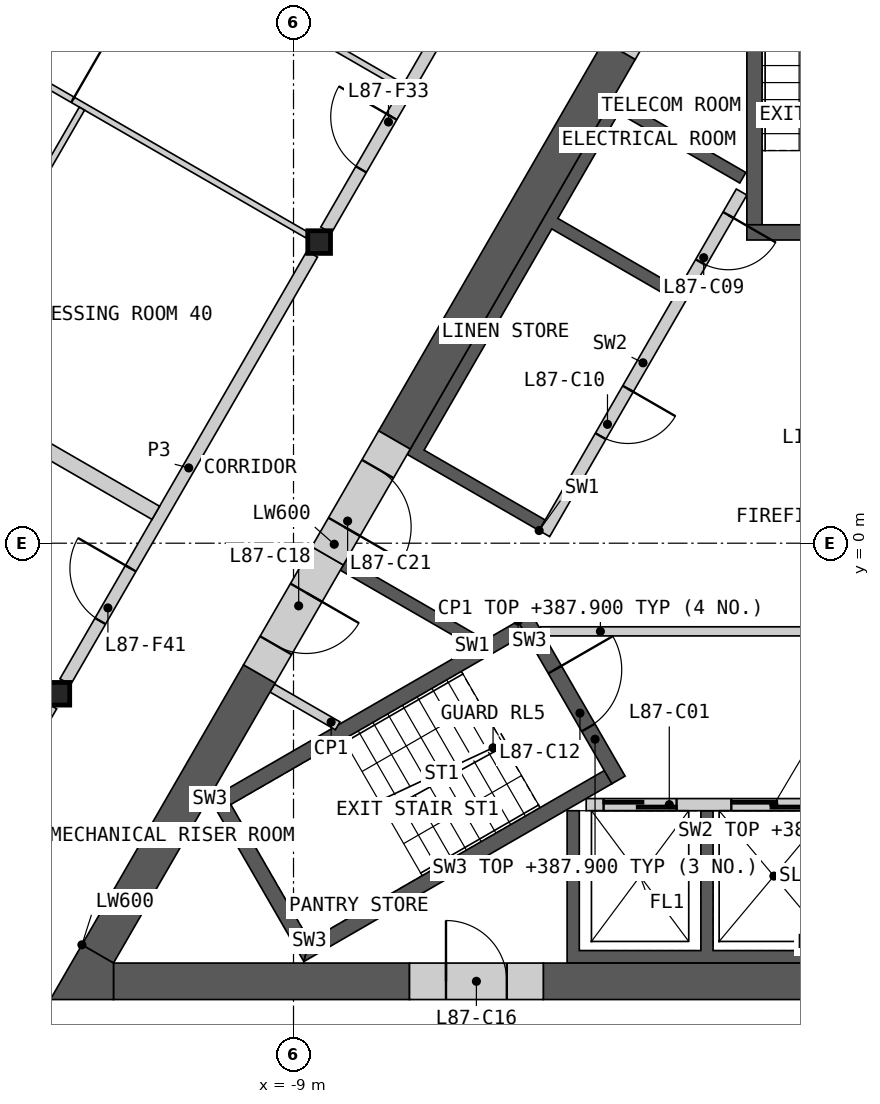
"""IFC4 building model, lengths in metres.
Left out: names, types, materials, properties, quantities, classifications, styles, units other than length and angle.
Written with IfcOpenShell. Run it as: python <this file> out.ifc"""

import sys

from ifc_helpers import new_model, si_unit, direction, frame, frame_2d, origin, origin_2d, place, context, subcontext, project, spatial, polyline, rectangle, i_section, outline, extrude, element, fill, save


model = new_model("IFC4")
c1 = context("Model", 3, precision=1e-05, world=origin(), true_north=direction((0.0, 1.0)))
c2 = subcontext(c1, "Body", "Model", "MODEL_VIEW")
j1 = project(units=[si_unit("LENGTHUNIT", "METRE"), si_unit("PLANEANGLEUNIT", "RADIAN")], contexts=[c1])
p1 = place(None, origin())
s1 = spatial("IfcSite", under=j1, at=p1, CompositionType="ELEMENT")
p2 = place(p1, origin())
s2 = spatial("IfcBuilding", under=s1, at=p2, CompositionType="ELEMENT")
p3 = place(p2, frame((0.0, 0.0, 384.8)))
s3 = spatial("IfcBuildingStorey", under=s2, at=p3, CompositionType="ELEMENT", Elevation=384.8)
for number, where, z_axis, x_axis in (
    (1, (-8.578, 4.953, 0.0), (0.0, 0.0, 1.0), (1.0, 0.0, 0.0)),
    (2, (-12.868, -2.476, 0.0), (0.0, 0.0, 1.0), (1.0, 0.0, 0.0)),
):
    element("IfcColumn", number, at=place(p3, frame(where, z_axis=z_axis, x_axis=x_axis)), inside=s3, PredefinedType="COLUMN", context=c2, shape_type="SweptSolid", body=[
        extrude(i_section(OverallWidth=0.374, OverallDepth=0.372, WebThickness=0.016, FlangeThickness=0.026, at=origin_2d()), origin(), (0.0, 0.0, 1.0), 3.4),
    ])
p4 = place(p3, origin())
e3 = element("IfcWall", 3, at=p4, inside=s3, PredefinedType="SHEAR", context=c2, shape_type="SweptSolid", body=[
    extrude(outline(polyline([(4.5, -4.4), (4.5, -6.906), (-4.5, -6.906), (-4.5, -4.4), (-4.3, -4.4), (-4.3, -6.7), (-2.3, -6.7), (-2.3, -4.4), (-2.1, -4.4), (-2.1, -6.7), (-0.1, -6.7), (-0.1, -4.4), (0.1, -4.4), (0.1, -6.7), (2.1, -6.7), (2.1, -4.4), (2.3, -4.4), (2.3, -6.7), (4.3, -6.7), (4.3, -4.4), (4.5, -4.4)])), origin(), (0.0, 0.0, 1.0), 3.1),
])
p5 = place(p3, frame((-4.187, -4.3, 0.0), z_axis=(0.0, 0.0, 1.0), x_axis=(1.0, 0.0, 0.0)))
e4 = element("IfcWall", 4, at=p5, inside=s3, PredefinedType="SOLIDWALL", context=c2, shape_type="SweptSolid", body=[
    extrude(rectangle(XDim=8.373, YDim=0.2, at=frame_2d((4.187, 0.0))), origin(), (0.0, 0.0, 1.0), 3.1),
])
p6 = place(p5, frame((0.287, 0.0, 0.0)))
e5 = element("IfcOpeningElement", 5, at=p6, cuts=e4, PredefinedType="OPENING", context=c2, shape_type="SweptSolid", body=[
    extrude(rectangle(XDim=1.2, YDim=2.1, at=frame_2d((0.6, 1.05))), frame((0.0, 0.11, 0.0), z_axis=(0.0, -1.0, 0.0), x_axis=(1.0, 0.0, 0.0)), (0.0, 0.0, 1.0), 0.22),
])
p7 = place(p5, frame((2.387, 0.0, 0.0)))
e6 = element("IfcOpeningElement", 6, at=p7, cuts=e4, PredefinedType="OPENING", context=c2, shape_type="SweptSolid", body=[
    extrude(rectangle(XDim=1.4, YDim=2.1, at=frame_2d((0.7, 1.05))), frame((0.0, 0.11, 0.0), z_axis=(0.0, -1.0, 0.0), x_axis=(1.0, 0.0, 0.0)), (0.0, 0.0, 1.0), 0.22),
])
p8 = place(p5, frame((4.737, 0.0, 0.0)))
e7 = element("IfcOpeningElement", 7, at=p8, cuts=e4, PredefinedType="OPENING", context=c2, shape_type="SweptSolid", body=[
    extrude(rectangle(XDim=1.1, YDim=2.1, at=frame_2d((0.55, 1.05))), frame((0.0, 0.11, 0.0), z_axis=(0.0, -1.0, 0.0), x_axis=(1.0, 0.0, 0.0)), (0.0, 0.0, 1.0), 0.22),
])
p9 = place(p5, frame((6.887, 0.0, 0.0)))
e8 = element("IfcOpeningElement", 8, at=p9, cuts=e4, PredefinedType="OPENING", context=c2, shape_type="SweptSolid", body=[
    extrude(rectangle(XDim=1.2, YDim=2.1, at=frame_2d((0.6, 1.05))), frame((0.0, 0.11, 0.0), z_axis=(0.0, -1.0, 0.0), x_axis=(1.0, 0.0, 0.0)), (0.0, 0.0, 1.0), 0.22),
])
p10 = place(p3, origin())
e9 = element("IfcWall", 9, at=p10, inside=s3, PredefinedType="SHEAR", context=c2, shape_type="SweptSolid", body=[
    extrude(outline(polyline([(-6.061, -1.697), (-8.231, -0.444), (-8.131, -0.271), (-5.96, -1.524), (-6.061, -1.697)])), origin(), (0.0, 0.0, 1.0), 3.1),
])
p11 = place(p3, origin())
e10 = element("IfcWall", 10, at=p11, inside=s3, PredefinedType="SHEAR", context=c2, shape_type="SweptSolid", body=[
    extrude(outline(polyline([(-4.96, 0.208), (-7.131, 1.461), (-3.731, 7.35), (-1.561, 6.097), (-1.66, 5.924), (-3.652, 7.074), (-4.652, 5.342), (-2.66, 4.192), (-2.76, 4.019), (-4.752, 5.169), (-6.852, 1.531), (-4.861, 0.381), (-4.96, 0.208)])), origin(), (0.0, 0.0, 1.0), 3.1),
])
p12 = place(p3, frame((-1.631, 5.776, 0.0), z_axis=(0.0, 0.0, 1.0), x_axis=(-0.499992876559, -0.866029516466, 0.0)))
e11 = element("IfcWall", 11, at=p12, inside=s3, PredefinedType="SOLIDWALL", context=c2, shape_type="SweptSolid", body=[
    extrude(rectangle(XDim=6.486, YDim=0.2, at=frame_2d((3.243, 0.0))), origin(), (0.0, 0.0, 1.0), 3.1),
])
p13 = place(p12, frame((0.437, 0.0, 0.0)))
e12 = element("IfcOpeningElement", 12, at=p13, cuts=e11, PredefinedType="OPENING", context=c2, shape_type="SweptSolid", body=[
    extrude(rectangle(XDim=0.9, YDim=2.1, at=frame_2d((0.45, 1.05))), frame((0.0, 0.11, 0.0), z_axis=(0.0, -1.0, 0.0), x_axis=(1.0, 0.0, 0.0)), (0.0, 0.0, 1.0), 0.22),
])
p14 = place(p12, frame((3.737, 0.0, 0.0)))
e13 = element("IfcOpeningElement", 13, at=p14, cuts=e11, PredefinedType="OPENING", context=c2, shape_type="SweptSolid", body=[
    extrude(rectangle(XDim=0.9, YDim=2.1, at=frame_2d((0.45, 1.05))), frame((0.0, 0.11, 0.0), z_axis=(0.0, -1.0, 0.0), x_axis=(1.0, 0.0, 0.0)), (0.0, 0.0, 1.0), 0.22),
])
p15 = place(p3, frame((-4.941, -1.45, 0.0), z_axis=(0.0, 0.0, 1.0), x_axis=(1.0, 0.0, 0.0)))
e14 = element("IfcWall", 14, at=p15, inside=s3, PredefinedType="PARTITIONING", context=c2, shape_type="SweptSolid", body=[
    extrude(rectangle(XDim=9.882, YDim=0.15, at=frame_2d((4.941, 0.0))), origin(), (0.0, 0.0, 1.0), 3.1),
])
p16 = place(p15, frame((4.391, 0.0, 0.0)))
e15 = element("IfcOpeningElement", 15, at=p16, cuts=e14, PredefinedType="OPENING", context=c2, shape_type="SweptSolid", body=[
    extrude(rectangle(XDim=1.1, YDim=2.1, at=frame_2d((0.55, 1.05))), frame((0.0, 0.085, 0.0), z_axis=(0.0, -1.0, 0.0), x_axis=(1.0, 0.0, 0.0)), (0.0, 0.0, 1.0), 0.17),
])
p17 = place(p3, origin())
e16 = element("IfcWall", 16, at=p17, inside=s3, PredefinedType="SHEAR", context=c2, shape_type="SweptSolid", body=[
    extrude(outline(polyline([(-5.307, -1.281), (-10.374, -4.206), (-10.032, -4.298), (-5.182, -1.498), (-5.307, -1.281)])), origin(), (0.0, 0.0, 1.0), 3.1),
])
p18 = place(p3, origin())
e17 = element("IfcWall", 17, at=p18, inside=s3, PredefinedType="SHEAR", context=c2, shape_type="SweptSolid", body=[
    extrude(outline(polyline([(-10.374, -4.206), (-8.83, -6.881), (-8.738, -6.539), (-10.032, -4.298), (-10.374, -4.206)])), origin(), (0.0, 0.0, 1.0), 3.1),
])
p19 = place(p3, origin())
e18 = element("IfcWall", 18, at=p19, inside=s3, PredefinedType="SHEAR", context=c2, shape_type="SweptSolid", body=[
    extrude(outline(polyline([(-8.738, -6.539), (-8.83, -6.881), (-3.763, -3.956), (-3.888, -3.739), (-8.738, -6.539)])), origin(), (0.0, 0.0, 1.0), 3.1),
])
p20 = place(p3, frame((-5.199, -1.219, 0.0), z_axis=(0.0, 0.0, 1.0), x_axis=(0.499982516597, -0.866035497597, 0.0)))
e19 = element("IfcWall", 19, at=p20, inside=s3, PredefinedType="SHEAR", context=c2, shape_type="SweptSolid", body=[
    extrude(rectangle(XDim=3.088, YDim=0.25, at=frame_2d((1.544, 0.0))), origin(), (0.0, 0.0, 1.0), 3.1),
])
p21 = place(p20, frame((0.994, 0.0, 0.0)))
e20 = element("IfcOpeningElement", 20, at=p21, cuts=e19, PredefinedType="OPENING", context=c2, shape_type="SweptSolid", body=[
    extrude(rectangle(XDim=1.1, YDim=2.1, at=frame_2d((0.55, 1.05))), frame((0.0, 0.135, 0.0), z_axis=(0.0, -1.0, 0.0), x_axis=(1.0, 0.0, 0.0)), (0.0, 0.0, 1.0), 0.27),
])
p22 = place(p3, origin())
e21 = element("IfcWall", 21, at=p22, inside=s3, PredefinedType="SHEAR", context=c2, shape_type="SweptSolid", body=[
    extrude(outline(polyline([(-1.294, 10.837), (-1.544, 11.087), (-1.544, 5.237), (-1.294, 5.237), (-1.294, 10.837)])), origin(), (0.0, 0.0, 1.0), 3.1),
])
p23 = place(p3, frame((1.544, 5.112, 0.0), z_axis=(0.0, 0.0, 1.0), x_axis=(-1.0, 0.0, 0.0)))
e22 = element("IfcWall", 22, at=p23, inside=s3, PredefinedType="SHEAR", context=c2, shape_type="SweptSolid", body=[
    extrude(rectangle(XDim=3.088, YDim=0.25, at=frame_2d((1.544, 0.0))), origin(), (0.0, 0.0, 1.0), 3.1),
])
p24 = place(p23, frame((0.994, 0.0, 0.0)))
e23 = element("IfcOpeningElement", 23, at=p24, cuts=e22, PredefinedType="OPENING", context=c2, shape_type="SweptSolid", body=[
    extrude(rectangle(XDim=1.1, YDim=2.1, at=frame_2d((0.55, 1.05))), frame((0.0, 0.135, 0.0), z_axis=(0.0, -1.0, 0.0), x_axis=(1.0, 0.0, 0.0)), (0.0, 0.0, 1.0), 0.27),
])
p25 = place(p3, frame((-9.35, -2.383, 0.0), z_axis=(0.0, 0.0, 1.0), x_axis=(0.866057962423, -0.499943602543, 0.0)))
e24 = element("IfcWall", 24, at=p25, inside=s3, PredefinedType="PARTITIONING", context=c2, shape_type="SweptSolid", body=[
    extrude(rectangle(XDim=1.242, YDim=0.15, at=frame_2d((0.621, 0.0))), origin(), (0.0, 0.0, 1.0), 3.1),
])
p26 = place(p3, frame((-4.892, -7.206, 0.0), z_axis=(0.0, 0.0, 1.0), x_axis=(1.0, 0.0, 0.0)))
e25 = element("IfcWall", 25, at=p26, inside=s3, PredefinedType="SHEAR", context=c2, shape_type="SweptSolid", body=[
    extrude(rectangle(XDim=14.261, YDim=0.6, at=frame_2d((7.13, 0.0))), origin(), (0.0, 0.0, 1.0), 3.1),
])
p27 = place(p3, frame((-11.961, -7.206, 0.0), z_axis=(0.0, 0.0, 1.0), x_axis=(1.0, 0.0, 0.0)))
e26 = element("IfcWall", 26, at=p27, inside=s3, PredefinedType="SHEAR", context=c2, shape_type="SweptSolid", body=[
    extrude(rectangle(XDim=4.868, YDim=0.6, at=frame_2d((2.434, 0.0))), origin(), (0.0, 0.0, 1.0), 3.1),
])
p28 = place(p3, frame((-3.639, 8.107, 0.0), z_axis=(0.0, 0.0, 1.0), x_axis=(-0.49999180351, -0.866030135978, 0.0)))
e27 = element("IfcWall", 27, at=p28, inside=s3, PredefinedType="SHEAR", context=c2, shape_type="SweptSolid", body=[
    extrude(rectangle(XDim=7.401, YDim=0.6, at=frame_2d((3.701, 0.0))), origin(), (0.0, 0.0, 1.0), 3.1),
])
p29 = place(p3, frame((-9.562, -2.15, 0.0), z_axis=(0.0, 0.0, 1.0), x_axis=(-0.500015214976, -0.866016619236, 0.0)))
e28 = element("IfcWall", 28, at=p29, inside=s3, PredefinedType="SHEAR", context=c2, shape_type="SweptSolid", body=[
    extrude(rectangle(XDim=5.318, YDim=0.6, at=frame_2d((2.659, 0.0))), origin(), (0.0, 0.0, 1.0), 3.1),
])
p30 = place(p3, origin())
e29 = element("IfcWall", 29, at=p30, inside=s3, PredefinedType="SHEAR", context=c2, shape_type="SweptSolid", body=[
    extrude(outline(polyline([(-12.48, -6.606), (-11.961, -6.906), (-11.961, -7.506), (-13.0, -7.506), (-12.48, -6.606)])), origin(), (0.0, 0.0, 1.0), 3.1),
])
p31 = place(p3, frame((-7.092, -7.206, 0.0), z_axis=(0.0, 0.0, 1.0), x_axis=(1.0, 0.0, 0.0)))
e30 = element("IfcWall", 30, at=p31, inside=s3, PredefinedType="SHEAR", context=c2, shape_type="SweptSolid", body=[
    extrude(rectangle(XDim=2.2, YDim=0.6, at=frame_2d((1.1, 0.0))), origin(), (0.0, 0.0, 1.0), 3.1),
])
p32 = place(p31, frame((0.6, 0.0, 0.0)))
e31 = element("IfcOpeningElement", 31, at=p32, cuts=e30, PredefinedType="OPENING", context=c2, shape_type="SweptSolid", body=[
    extrude(rectangle(XDim=1.0, YDim=2.1, at=frame_2d((0.5, 1.05))), frame((0.0, 0.31, 0.0), z_axis=(0.0, -1.0, 0.0), x_axis=(1.0, 0.0, 0.0)), (0.0, 0.0, 1.0), 0.62),
])
p33 = place(p3, frame((-8.44, -0.208, 0.0), z_axis=(0.0, 0.0, 1.0), x_axis=(-0.500001951578, -0.866024277037, 0.0)))
e32 = element("IfcWall", 32, at=p33, inside=s3, PredefinedType="SHEAR", context=c2, shape_type="SweptSolid", body=[
    extrude(rectangle(XDim=2.243, YDim=0.6, at=frame_2d((1.122, 0.0))), origin(), (0.0, 0.0, 1.0), 3.1),
])
p34 = place(p33, frame((0.7, 0.0, 0.0)))
e33 = element("IfcOpeningElement", 33, at=p34, cuts=e32, PredefinedType="OPENING", context=c2, shape_type="SweptSolid", body=[
    extrude(rectangle(XDim=1.0, YDim=2.1, at=frame_2d((0.5, 1.05))), frame((0.0, 0.31, 0.0), z_axis=(0.0, -1.0, 0.0), x_axis=(1.0, 0.0, 0.0)), (0.0, 0.0, 1.0), 0.62),
])
p35 = place(p3, frame((-2.539, 10.013, 0.0), z_axis=(0.0, 0.0, 1.0), x_axis=(-0.50002983664, -0.866008176907, 0.0)))
e34 = element("IfcWall", 34, at=p35, inside=s3, PredefinedType="SHEAR", context=c2, shape_type="SweptSolid", body=[
    extrude(rectangle(XDim=2.2, YDim=0.6, at=frame_2d((1.1, 0.0))), origin(), (0.0, 0.0, 1.0), 3.1),
])
p36 = place(p35, frame((0.6, 0.0, 0.0)))
e35 = element("IfcOpeningElement", 35, at=p36, cuts=e34, PredefinedType="OPENING", context=c2, shape_type="SweptSolid", body=[
    extrude(rectangle(XDim=1.0, YDim=2.1, at=frame_2d((0.5, 1.05))), frame((0.0, 0.31, 0.0), z_axis=(0.0, -1.0, 0.0), x_axis=(1.0, 0.0, 0.0)), (0.0, 0.0, 1.0), 0.62),
])
p37 = place(p3, frame((-7.34, 1.698, 0.0), z_axis=(0.0, 0.0, 1.0), x_axis=(-0.50002983664, -0.866008176907, 0.0)))
e36 = element("IfcWall", 36, at=p37, inside=s3, PredefinedType="SHEAR", context=c2, shape_type="SweptSolid", body=[
    extrude(rectangle(XDim=2.2, YDim=0.6, at=frame_2d((1.1, 0.0))), origin(), (0.0, 0.0, 1.0), 3.1),
])
p38 = place(p37, frame((0.55, 0.0, 0.0)))
e37 = element("IfcOpeningElement", 37, at=p38, cuts=e36, PredefinedType="OPENING", context=c2, shape_type="SweptSolid", body=[
    extrude(rectangle(XDim=1.1, YDim=2.1, at=frame_2d((0.55, 1.05))), frame((0.0, 0.31, 0.0), z_axis=(0.0, -1.0, 0.0), x_axis=(1.0, 0.0, 0.0)), (0.0, 0.0, 1.0), 0.62),
])
p39 = place(p3, frame((-8.465, 5.15, 0.0), z_axis=(0.0, 0.0, 1.0), x_axis=(0.499992155518, 0.866029932751, 0.0)))
e38 = element("IfcWall", 38, at=p39, inside=s3, PredefinedType="PARTITIONING", context=c2, shape_type="SweptSolid", body=[
    extrude(rectangle(XDim=8.123, YDim=0.2, at=frame_2d((4.062, 0.0))), origin(), (0.0, 0.0, 1.0), 3.1),
])
p40 = place(p39, frame((1.153, 0.0, 0.0)))
e39 = element("IfcOpeningElement", 39, at=p40, cuts=e38, PredefinedType="OPENING", context=c2, shape_type="SweptSolid", body=[
    extrude(rectangle(XDim=1.0, YDim=2.1, at=frame_2d((0.5, 1.05))), frame((0.0, 0.11, 0.0), z_axis=(0.0, -1.0, 0.0), x_axis=(1.0, 0.0, 0.0)), (0.0, 0.0, 1.0), 0.22),
])
p41 = place(p3, frame((-12.754, -2.279, 0.0), z_axis=(0.0, 0.0, 1.0), x_axis=(0.500001682468, 0.866024432409, 0.0)))
e40 = element("IfcWall", 40, at=p41, inside=s3, PredefinedType="PARTITIONING", context=c2, shape_type="SweptSolid", body=[
    extrude(rectangle(XDim=8.124, YDim=0.2, at=frame_2d((4.062, 0.0))), origin(), (0.0, 0.0, 1.0), 3.1),
])
p42 = place(p41, frame((1.153, 0.0, 0.0)))
e41 = element("IfcOpeningElement", 41, at=p42, cuts=e40, PredefinedType="OPENING", context=c2, shape_type="SweptSolid", body=[
    extrude(rectangle(XDim=1.0, YDim=2.1, at=frame_2d((0.5, 1.05))), frame((0.0, 0.11, 0.0), z_axis=(0.0, -1.0, 0.0), x_axis=(1.0, 0.0, 0.0)), (0.0, 0.0, 1.0), 0.22),
])
p43 = place(p3, frame((-17.414, 4.049, 0.0), z_axis=(0.0, 0.0, 1.0), x_axis=(0.866033839264, -0.499985389037, 0.0)))
e42 = element("IfcWall", 42, at=p43, inside=s3, PredefinedType="PARTITIONING", context=c2, shape_type="SweptSolid", body=[
    extrude(rectangle(XDim=7.1, YDim=0.25, at=frame_2d((3.55, 0.0))), origin(), (0.0, 0.0, 1.0), 2.33),
])
p44 = place(p3, frame((-15.131, -6.397, 0.0), z_axis=(0.0, 0.0, 1.0), x_axis=(0.499986217557, 0.866033360935, 0.0)))
e43 = element("IfcWall", 43, at=p44, inside=s3, PredefinedType="PARTITIONING", context=c2, shape_type="SweptSolid", body=[
    extrude(rectangle(XDim=4.3, YDim=0.2, at=frame_2d((2.15, 0.0))), origin(), (0.0, 0.0, 1.0), 3.1),
])
p45 = place(p3, frame((-18.869, 10.894, 0.0), z_axis=(0.0, 0.0, 1.0), x_axis=(0.866023724155, -0.500002909193, 0.0)))
e44 = element("IfcWall", 44, at=p45, inside=s3, PredefinedType="PARTITIONING", context=c2, shape_type="SweptSolid", body=[
    extrude(rectangle(XDim=11.655, YDim=0.1, at=frame_2d((5.827, 0.0))), origin(), (0.0, 0.0, 1.0), 2.33),
])
p46 = place(p45, frame((6.253, 0.0, 0.0)))
e45 = element("IfcOpeningElement", 45, at=p46, cuts=e44, PredefinedType="OPENING", context=c2, shape_type="SweptSolid", body=[
    extrude(rectangle(XDim=0.95, YDim=2.1, at=frame_2d((0.475, 1.05))), frame((0.0, 0.06, 0.0), z_axis=(0.0, -1.0, 0.0), x_axis=(1.0, 0.0, 0.0)), (0.0, 0.0, 1.0), 0.12),
])
p47 = place(p3, frame((-14.992, 2.796, 0.0), z_axis=(0.0, 0.0, 1.0), x_axis=(0.499990214365, 0.86603105345, 0.0)))
e46 = element("IfcWall", 46, at=p47, inside=s3, PredefinedType="PARTITIONING", context=c2, shape_type="SweptSolid", body=[
    extrude(rectangle(XDim=5.025, YDim=0.1, at=frame_2d((2.512, 0.0))), origin(), (0.0, 0.0, 1.0), 2.33),
])
p48 = place(p47, frame((1.68, 0.0, 0.0)))
e47 = element("IfcOpeningElement", 47, at=p48, cuts=e46, PredefinedType="OPENING", context=c2, shape_type="SweptSolid", body=[
    extrude(rectangle(XDim=0.95, YDim=2.1, at=frame_2d((0.475, 1.05))), frame((0.0, 0.06, 0.0), z_axis=(0.0, -1.0, 0.0), x_axis=(1.0, 0.0, 0.0)), (0.0, 0.0, 1.0), 0.12),
])
p49 = place(p3, frame((-9.51, 8.839, 0.0), z_axis=(0.0, 0.0, 1.0), x_axis=(0.866029095148, -0.499993606316, 0.0)))
e48 = element("IfcWall", 48, at=p49, inside=s3, PredefinedType="PARTITIONING", context=c2, shape_type="SweptSolid", body=[
    extrude(rectangle(XDim=2.65, YDim=0.1, at=frame_2d((1.325, 0.0))), origin(), (0.0, 0.0, 1.0), 2.33),
])
p50 = place(p6, origin())
e49 = element("IfcDoor", 49, at=p50, inside=s3, OperationType="SLIDING_TO_LEFT", PredefinedType="DOOR", context=c2, shape_type="SweptSolid", body=[
    extrude(rectangle(XDim=1.2, YDim=2.1, at=frame_2d((0.6, 1.05))), frame((0.0, 0.025, 0.0), z_axis=(0.0, -1.0, 0.0), x_axis=(1.0, 0.0, 0.0)), (0.0, 0.0, 1.0), 0.05),
])
fill(e5, e49)
p51 = place(p7, origin())
e50 = element("IfcDoor", 50, at=p51, inside=s3, OperationType="SLIDING_TO_LEFT", PredefinedType="DOOR", context=c2, shape_type="SweptSolid", body=[
    extrude(rectangle(XDim=1.4, YDim=2.1, at=frame_2d((0.7, 1.05))), frame((0.0, 0.025, 0.0), z_axis=(0.0, -1.0, 0.0), x_axis=(1.0, 0.0, 0.0)), (0.0, 0.0, 1.0), 0.05),
])
fill(e6, e50)
p52 = place(p13, origin())
e51 = element("IfcDoor", 51, at=p52, inside=s3, OperationType="SINGLE_SWING_LEFT", PredefinedType="DOOR", context=c2, shape_type="SweptSolid", body=[
    extrude(rectangle(XDim=0.9, YDim=2.1, at=frame_2d((0.45, 1.05))), frame((0.0, 0.025, 0.0), z_axis=(0.0, -1.0, 0.0), x_axis=(1.0, 0.0, 0.0)), (0.0, 0.0, 1.0), 0.05),
])
fill(e12, e51)
p53 = place(p14, origin())
e52 = element("IfcDoor", 52, at=p53, inside=s3, OperationType="SINGLE_SWING_LEFT", PredefinedType="DOOR", context=c2, shape_type="SweptSolid", body=[
    extrude(rectangle(XDim=0.9, YDim=2.1, at=frame_2d((0.45, 1.05))), frame((0.0, 0.025, 0.0), z_axis=(0.0, -1.0, 0.0), x_axis=(1.0, 0.0, 0.0)), (0.0, 0.0, 1.0), 0.05),
])
fill(e13, e52)
p54 = place(p21, origin())
e53 = element("IfcDoor", 53, at=p54, inside=s3, OperationType="SINGLE_SWING_LEFT", PredefinedType="DOOR", context=c2, shape_type="SweptSolid", body=[
    extrude(rectangle(XDim=1.1, YDim=2.1, at=frame_2d((0.55, 1.05))), frame((0.0, 0.025, 0.0), z_axis=(0.0, -1.0, 0.0), x_axis=(1.0, 0.0, 0.0)), (0.0, 0.0, 1.0), 0.05),
])
fill(e20, e53)
p55 = place(p32, origin())
e54 = element("IfcDoor", 54, at=p55, inside=s3, OperationType="SINGLE_SWING_LEFT", PredefinedType="DOOR", context=c2, shape_type="SweptSolid", body=[
    extrude(rectangle(XDim=1.0, YDim=2.1, at=frame_2d((0.5, 1.05))), frame((0.0, 0.055, 0.0), z_axis=(0.0, -1.0, 0.0), x_axis=(1.0, 0.0, 0.0)), (0.0, 0.0, 1.0), 0.05),
])
fill(e31, e54)
p56 = place(p34, origin())
e55 = element("IfcDoor", 55, at=p56, inside=s3, OperationType="SINGLE_SWING_LEFT", PredefinedType="DOOR", context=c2, shape_type="SweptSolid", body=[
    extrude(rectangle(XDim=1.0, YDim=2.1, at=frame_2d((0.5, 1.05))), frame((0.0, 0.055, 0.0), z_axis=(0.0, -1.0, 0.0), x_axis=(1.0, 0.0, 0.0)), (0.0, 0.0, 1.0), 0.05),
])
fill(e33, e55)
p57 = place(p38, origin())
e56 = element("IfcDoor", 56, at=p57, inside=s3, OperationType="SINGLE_SWING_RIGHT", PredefinedType="DOOR", context=c2, shape_type="SweptSolid", body=[
    extrude(rectangle(XDim=1.1, YDim=2.1, at=frame_2d((0.55, 1.05))), frame((0.0, 0.055, 0.0), z_axis=(0.0, -1.0, 0.0), x_axis=(1.0, 0.0, 0.0)), (0.0, 0.0, 1.0), 0.05),
])
fill(e37, e56)
p58 = place(p40, origin())
e57 = element("IfcDoor", 57, at=p58, inside=s3, OperationType="SINGLE_SWING_RIGHT", PredefinedType="DOOR", context=c2, shape_type="SweptSolid", body=[
    extrude(rectangle(XDim=1.0, YDim=2.1, at=frame_2d((0.5, 1.05))), frame((0.0, 0.025, 0.0), z_axis=(0.0, -1.0, 0.0), x_axis=(1.0, 0.0, 0.0)), (0.0, 0.0, 1.0), 0.05),
])
fill(e39, e57)
p59 = place(p46, origin())
e58 = element("IfcDoor", 58, at=p59, inside=s3, OperationType="SINGLE_SWING_RIGHT", PredefinedType="DOOR", context=c2, shape_type="SweptSolid", body=[
    extrude(rectangle(XDim=0.95, YDim=2.1, at=frame_2d((0.475, 1.05))), frame((0.0, 0.025, 0.0), z_axis=(0.0, -1.0, 0.0), x_axis=(1.0, 0.0, 0.0)), (0.0, 0.0, 1.0), 0.05),
])
fill(e45, e58)
p60 = place(p42, origin())
e59 = element("IfcDoor", 59, at=p60, inside=s3, OperationType="SINGLE_SWING_RIGHT", PredefinedType="DOOR", context=c2, shape_type="SweptSolid", body=[
    extrude(rectangle(XDim=1.0, YDim=2.1, at=frame_2d((0.5, 1.05))), frame((0.0, 0.025, 0.0), z_axis=(0.0, -1.0, 0.0), x_axis=(1.0, 0.0, 0.0)), (0.0, 0.0, 1.0), 0.05),
])
fill(e41, e59)
save(model, sys.argv[1])
